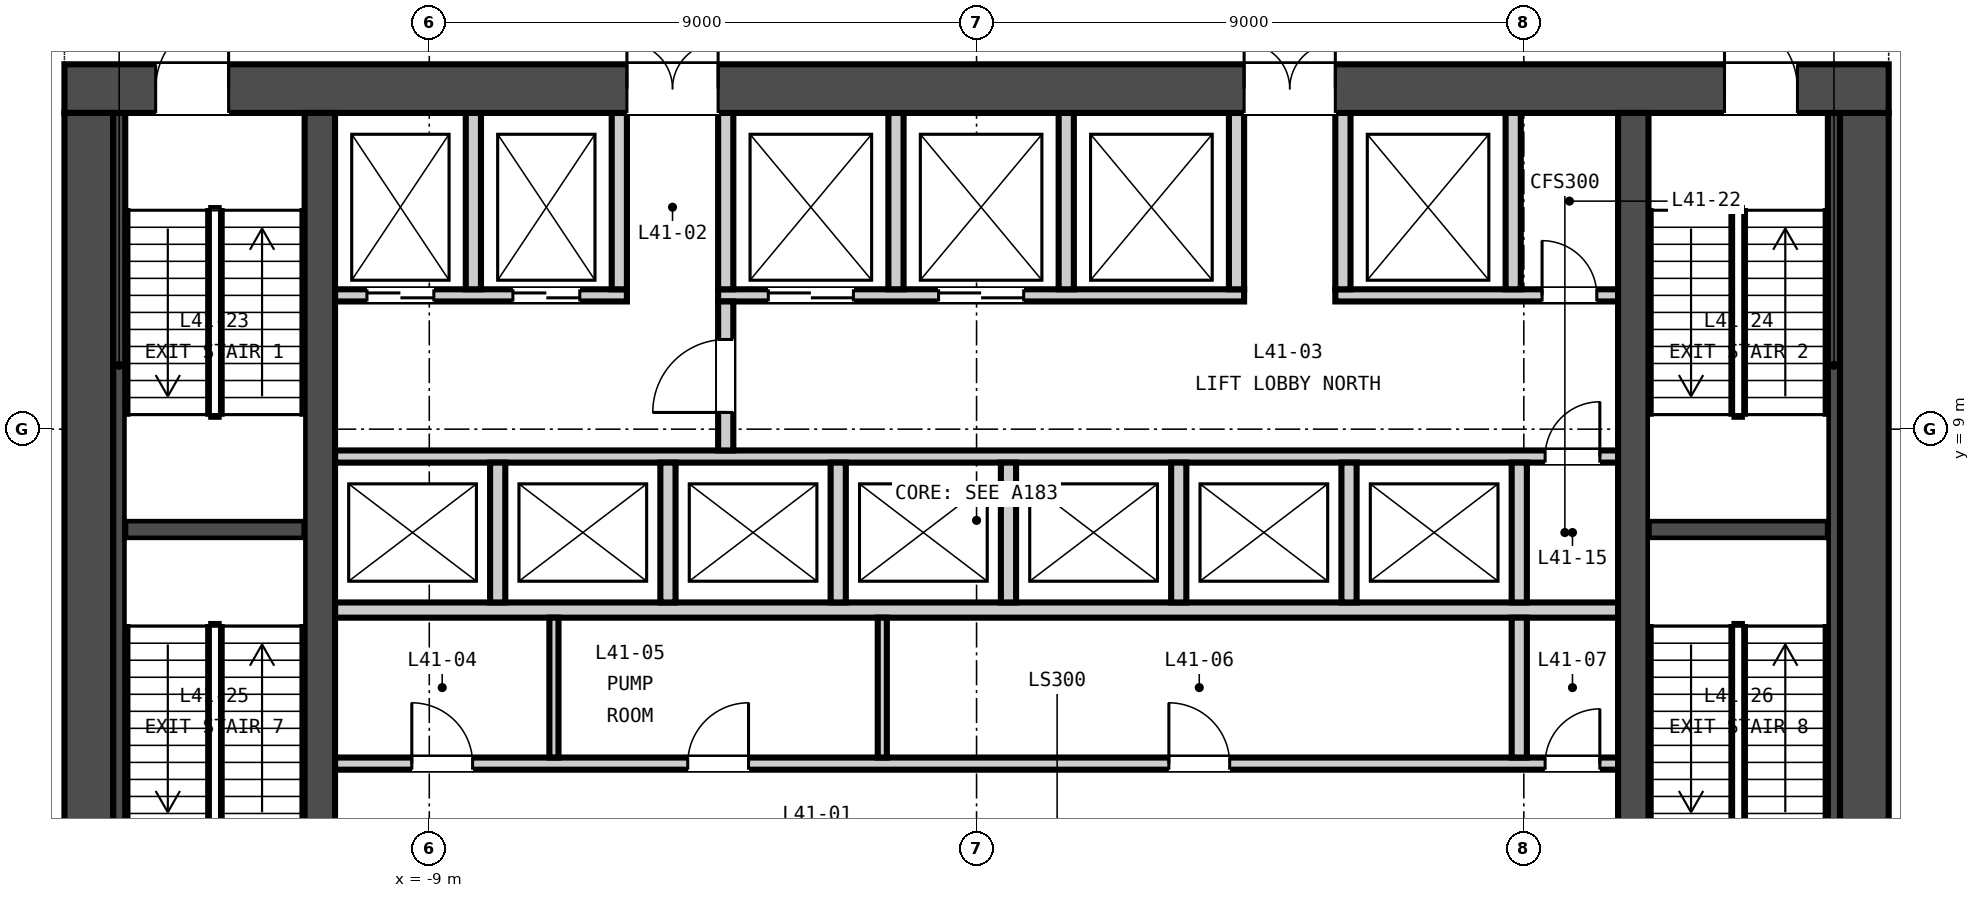
"""IFC4 building model, lengths in metres.
Left out: names, types, materials, properties, quantities, classifications, styles, units other than length and angle.
Written with IfcOpenShell. Run it as: python <this file> out.ifc"""

import sys

from ifc_helpers import new_model, si_unit, direction, frame, frame_2d, origin, place, context, subcontext, project, spatial, rectangle, extrude, element, fill, save


model = new_model("IFC4")
c1 = context("Model", 3, precision=1e-05, world=origin(), true_north=direction((0.0, 1.0)))
c2 = subcontext(c1, "Body", "Model", "MODEL_VIEW")
j1 = project(units=[si_unit("LENGTHUNIT", "METRE"), si_unit("PLANEANGLEUNIT", "RADIAN")], contexts=[c1])
p1 = place(None, origin())
s1 = spatial("IfcSite", under=j1, at=p1, CompositionType="ELEMENT")
p2 = place(p1, origin())
s2 = spatial("IfcBuilding", under=s1, at=p2, CompositionType="ELEMENT")
p3 = place(p2, frame((0.0, 0.0, 166.3)))
s3 = spatial("IfcBuildingStorey", under=s2, at=p3, CompositionType="ELEMENT", Elevation=166.3)
p4 = place(p3, frame((-15.0, 14.6, -0.3), z_axis=(0.0, 0.0, 1.0), x_axis=(1.0, 0.0, 0.0)))
e1 = element("IfcWall", 1, at=p4, inside=s3, PredefinedType="SOLIDWALL", context=c2, shape_type="SweptSolid", body=[
    extrude(rectangle(XDim=30.0, YDim=0.8, at=frame_2d((15.0, 0.0))), origin(), (0.0, 0.0, 1.0), 4.65),
])
p5 = place(p4, frame((9.25, 0.0, 0.3)))
e2 = element("IfcOpeningElement", 2, at=p5, cuts=e1, PredefinedType="OPENING", context=c2, shape_type="SweptSolid", body=[
    extrude(rectangle(XDim=1.5, YDim=2.1, at=frame_2d((0.75, 1.05))), frame((0.0, 0.41, 0.0), z_axis=(0.0, -1.0, 0.0), x_axis=(1.0, 0.0, 0.0)), (0.0, 0.0, 1.0), 0.82),
])
p6 = place(p4, frame((19.4, 0.0, 0.3)))
e3 = element("IfcOpeningElement", 3, at=p6, cuts=e1, PredefinedType="OPENING", context=c2, shape_type="SweptSolid", body=[
    extrude(rectangle(XDim=1.5, YDim=2.1, at=frame_2d((0.75, 1.05))), frame((0.0, 0.41, 0.0), z_axis=(0.0, -1.0, 0.0), x_axis=(1.0, 0.0, 0.0)), (0.0, 0.0, 1.0), 0.82),
])
p7 = place(p4, frame((1.5, 0.0, 0.3)))
e4 = element("IfcOpeningElement", 4, at=p7, cuts=e1, PredefinedType="OPENING", context=c2, shape_type="SweptSolid", body=[
    extrude(rectangle(XDim=1.2, YDim=2.1, at=frame_2d((0.6, 1.05))), frame((0.0, 0.41, 0.0), z_axis=(0.0, -1.0, 0.0), x_axis=(1.0, 0.0, 0.0)), (0.0, 0.0, 1.0), 0.82),
])
p8 = place(p4, frame((27.3, 0.0, 0.3)))
e5 = element("IfcOpeningElement", 5, at=p8, cuts=e1, PredefinedType="OPENING", context=c2, shape_type="SweptSolid", body=[
    extrude(rectangle(XDim=1.2, YDim=2.1, at=frame_2d((0.6, 1.05))), frame((0.0, 0.41, 0.0), z_axis=(0.0, -1.0, 0.0), x_axis=(1.0, 0.0, 0.0)), (0.0, 0.0, 1.0), 0.82),
])
for number, where, z_axis, x_axis in (
    (6, (-14.6, 0.8, -0.3), (0.0, 0.0, 1.0), (0.0, 1.0, 0.0)),
    (7, (14.6, 0.8, -0.3), (0.0, 0.0, 1.0), (0.0, 1.0, 0.0)),
):
    element("IfcWall", number, at=place(p3, frame(where, z_axis=z_axis, x_axis=x_axis)), inside=s3, PredefinedType="SOLIDWALL", context=c2, shape_type="SweptSolid", body=[
        extrude(rectangle(XDim=13.4, YDim=0.8, at=frame_2d((6.7, 0.0))), origin(), (0.0, 0.0, 1.0), 4.65),
    ])
for number, where, z_axis, x_axis in (
    (8, (-10.8, 0.8, -0.3), (0.0, 0.0, 1.0), (0.0, 1.0, 0.0)),
    (9, (10.8, 0.8, -0.3), (0.0, 0.0, 1.0), (0.0, 1.0, 0.0)),
):
    element("IfcWall", number, at=place(p3, frame(where, z_axis=z_axis, x_axis=x_axis)), inside=s3, PredefinedType="SOLIDWALL", context=c2, shape_type="SweptSolid", body=[
        extrude(rectangle(XDim=13.4, YDim=0.5, at=frame_2d((6.7, 0.0))), origin(), (0.0, 0.0, 1.0), 4.65),
    ])
p9 = place(p3, frame((-10.55, 3.5, 0.0), z_axis=(0.0, 0.0, 1.0), x_axis=(1.0, 0.0, 0.0)))
e10 = element("IfcWall", 10, at=p9, inside=s3, PredefinedType="PARTITIONING", context=c2, shape_type="SweptSolid", body=[
    extrude(rectangle(XDim=21.1, YDim=0.2, at=frame_2d((10.55, 0.0))), origin(), (0.0, 0.0, 1.0), 4.35),
])
p10 = place(p9, frame((1.262, 0.0, 0.0)))
e11 = element("IfcOpeningElement", 11, at=p10, cuts=e10, PredefinedType="OPENING", context=c2, shape_type="SweptSolid", body=[
    extrude(rectangle(XDim=1.0, YDim=2.1, at=frame_2d((0.5, 1.05))), frame((0.0, 0.11, 0.0), z_axis=(0.0, -1.0, 0.0), x_axis=(1.0, 0.0, 0.0)), (0.0, 0.0, 1.0), 0.22),
])
p11 = place(p9, frame((5.8, 0.0, 0.0)))
e12 = element("IfcOpeningElement", 12, at=p11, cuts=e10, PredefinedType="OPENING", context=c2, shape_type="SweptSolid", body=[
    extrude(rectangle(XDim=1.0, YDim=2.1, at=frame_2d((0.5, 1.05))), frame((0.0, 0.11, 0.0), z_axis=(0.0, -1.0, 0.0), x_axis=(1.0, 0.0, 0.0)), (0.0, 0.0, 1.0), 0.22),
])
p12 = place(p9, frame((13.712, 0.0, 0.0)))
e13 = element("IfcOpeningElement", 13, at=p12, cuts=e10, PredefinedType="OPENING", context=c2, shape_type="SweptSolid", body=[
    extrude(rectangle(XDim=1.0, YDim=2.1, at=frame_2d((0.5, 1.05))), frame((0.0, 0.11, 0.0), z_axis=(0.0, -1.0, 0.0), x_axis=(1.0, 0.0, 0.0)), (0.0, 0.0, 1.0), 0.22),
])
p13 = place(p9, frame((19.9, 0.0, 0.0)))
e14 = element("IfcOpeningElement", 14, at=p13, cuts=e10, PredefinedType="OPENING", context=c2, shape_type="SweptSolid", body=[
    extrude(rectangle(XDim=0.9, YDim=2.1, at=frame_2d((0.45, 1.05))), frame((0.0, 0.11, 0.0), z_axis=(0.0, -1.0, 0.0), x_axis=(1.0, 0.0, 0.0)), (0.0, 0.0, 1.0), 0.22),
])
p14 = place(p3, frame((-10.55, 6.025, 0.0), z_axis=(0.0, 0.0, 1.0), x_axis=(1.0, 0.0, 0.0)))
e15 = element("IfcWall", 15, at=p14, inside=s3, PredefinedType="PARTITIONING", context=c2, shape_type="SweptSolid", body=[
    extrude(rectangle(XDim=21.1, YDim=0.25, at=frame_2d((10.55, 0.0))), origin(), (0.0, 0.0, 1.0), 4.35),
])
p15 = place(p3, frame((-10.55, 8.55, 0.0), z_axis=(0.0, 0.0, 1.0), x_axis=(1.0, 0.0, 0.0)))
e16 = element("IfcWall", 16, at=p15, inside=s3, PredefinedType="PARTITIONING", context=c2, shape_type="SweptSolid", body=[
    extrude(rectangle(XDim=21.1, YDim=0.2, at=frame_2d((10.55, 0.0))), origin(), (0.0, 0.0, 1.0), 4.35),
])
p16 = place(p15, frame((19.9, 0.0, 0.0)))
e17 = element("IfcOpeningElement", 17, at=p16, cuts=e16, PredefinedType="OPENING", context=c2, shape_type="SweptSolid", body=[
    extrude(rectangle(XDim=0.9, YDim=2.1, at=frame_2d((0.45, 1.05))), frame((0.0, 0.11, 0.0), z_axis=(0.0, -1.0, 0.0), x_axis=(1.0, 0.0, 0.0)), (0.0, 0.0, 1.0), 0.22),
])
p17 = place(p3, frame((-10.55, 11.2, 0.0), z_axis=(0.0, 0.0, 1.0), x_axis=(1.0, 0.0, 0.0)))
e18 = element("IfcWall", 18, at=p17, inside=s3, PredefinedType="PARTITIONING", context=c2, shape_type="SweptSolid", body=[
    extrude(rectangle(XDim=4.8, YDim=0.2, at=frame_2d((2.4, 0.0))), origin(), (0.0, 0.0, 1.0), 4.35),
])
p18 = place(p17, frame((0.525, 0.0, 0.0)))
e19 = element("IfcOpeningElement", 19, at=p18, cuts=e18, PredefinedType="OPENING", context=c2, shape_type="SweptSolid", body=[
    extrude(rectangle(XDim=1.1, YDim=2.1, at=frame_2d((0.55, 1.05))), frame((0.0, 0.11, 0.0), z_axis=(0.0, -1.0, 0.0), x_axis=(1.0, 0.0, 0.0)), (0.0, 0.0, 1.0), 0.22),
])
p19 = place(p17, frame((2.925, 0.0, 0.0)))
e20 = element("IfcOpeningElement", 20, at=p19, cuts=e18, PredefinedType="OPENING", context=c2, shape_type="SweptSolid", body=[
    extrude(rectangle(XDim=1.1, YDim=2.1, at=frame_2d((0.55, 1.05))), frame((0.0, 0.11, 0.0), z_axis=(0.0, -1.0, 0.0), x_axis=(1.0, 0.0, 0.0)), (0.0, 0.0, 1.0), 0.22),
])
p20 = place(p3, frame((-4.25, 11.2, 0.0), z_axis=(0.0, 0.0, 1.0), x_axis=(1.0, 0.0, 0.0)))
e21 = element("IfcWall", 21, at=p20, inside=s3, PredefinedType="PARTITIONING", context=c2, shape_type="SweptSolid", body=[
    extrude(rectangle(XDim=8.65, YDim=0.2, at=frame_2d((4.325, 0.0))), origin(), (0.0, 0.0, 1.0), 4.35),
])
p21 = place(p20, frame((0.825, 0.0, 0.0)))
e22 = element("IfcOpeningElement", 22, at=p21, cuts=e21, PredefinedType="OPENING", context=c2, shape_type="SweptSolid", body=[
    extrude(rectangle(XDim=1.4, YDim=2.1, at=frame_2d((0.7, 1.05))), frame((0.0, 0.11, 0.0), z_axis=(0.0, -1.0, 0.0), x_axis=(1.0, 0.0, 0.0)), (0.0, 0.0, 1.0), 0.22),
])
p22 = place(p20, frame((3.625, 0.0, 0.0)))
e23 = element("IfcOpeningElement", 23, at=p22, cuts=e21, PredefinedType="OPENING", context=c2, shape_type="SweptSolid", body=[
    extrude(rectangle(XDim=1.4, YDim=2.1, at=frame_2d((0.7, 1.05))), frame((0.0, 0.11, 0.0), z_axis=(0.0, -1.0, 0.0), x_axis=(1.0, 0.0, 0.0)), (0.0, 0.0, 1.0), 0.22),
])
p23 = place(p3, frame((5.9, 11.2, 0.0), z_axis=(0.0, 0.0, 1.0), x_axis=(1.0, 0.0, 0.0)))
e24 = element("IfcWall", 24, at=p23, inside=s3, PredefinedType="PARTITIONING", context=c2, shape_type="SweptSolid", body=[
    extrude(rectangle(XDim=4.65, YDim=0.2, at=frame_2d((2.325, 0.0))), origin(), (0.0, 0.0, 1.0), 4.35),
])
p24 = place(p23, frame((3.4, 0.0, 0.0)))
e25 = element("IfcOpeningElement", 25, at=p24, cuts=e24, PredefinedType="OPENING", context=c2, shape_type="SweptSolid", body=[
    extrude(rectangle(XDim=0.9, YDim=2.1, at=frame_2d((0.45, 1.05))), frame((0.0, 0.11, 0.0), z_axis=(0.0, -1.0, 0.0), x_axis=(1.0, 0.0, 0.0)), (0.0, 0.0, 1.0), 0.22),
])
p25 = place(p3, frame((-4.125, 8.65, 0.0), z_axis=(0.0, 0.0, 1.0), x_axis=(0.0, 1.0, 0.0)))
e26 = element("IfcWall", 26, at=p25, inside=s3, PredefinedType="PARTITIONING", context=c2, shape_type="SweptSolid", body=[
    extrude(rectangle(XDim=2.45, YDim=0.25, at=frame_2d((1.225, 0.0))), origin(), (0.0, 0.0, 1.0), 4.35),
])
p26 = place(p25, frame((0.625, 0.0, 0.0)))
e27 = element("IfcOpeningElement", 27, at=p26, cuts=e26, PredefinedType="OPENING", context=c2, shape_type="SweptSolid", body=[
    extrude(rectangle(XDim=1.2, YDim=2.1, at=frame_2d((0.6, 1.05))), frame((0.0, 0.135, 0.0), z_axis=(0.0, -1.0, 0.0), x_axis=(1.0, 0.0, 0.0)), (0.0, 0.0, 1.0), 0.27),
])
for number, where, z_axis, x_axis in (
    (28, (-6.95, 3.6, 0.0), (0.0, 0.0, 1.0), (0.0, 1.0, 0.0)),
    (29, (-1.55, 3.6, 0.0), (0.0, 0.0, 1.0), (0.0, 1.0, 0.0)),
):
    element("IfcWall", number, at=place(p3, frame(where, z_axis=z_axis, x_axis=x_axis)), inside=s3, PredefinedType="PARTITIONING", context=c2, shape_type="SweptSolid", body=[
        extrude(rectangle(XDim=2.3, YDim=0.15, at=frame_2d((1.15, 0.0))), origin(), (0.0, 0.0, 1.0), 4.35),
    ])
p27 = place(p3, frame((8.925, 3.6, 0.0), z_axis=(0.0, 0.0, 1.0), x_axis=(0.0, 1.0, 0.0)))
e30 = element("IfcWall", 30, at=p27, inside=s3, PredefinedType="PARTITIONING", context=c2, shape_type="SweptSolid", body=[
    extrude(rectangle(XDim=2.3, YDim=0.25, at=frame_2d((1.15, 0.0))), origin(), (0.0, 0.0, 1.0), 4.35),
])
for number, where, z_axis, x_axis in (
    (31, (-7.875, 6.15, 0.0), (0.0, 0.0, 1.0), (0.0, 1.0, 0.0)),
    (32, (-5.075, 6.15, 0.0), (0.0, 0.0, 1.0), (0.0, 1.0, 0.0)),
    (33, (-2.275, 6.15, 0.0), (0.0, 0.0, 1.0), (0.0, 1.0, 0.0)),
    (34, (0.525, 6.15, 0.0), (0.0, 0.0, 1.0), (0.0, 1.0, 0.0)),
    (35, (3.325, 6.15, 0.0), (0.0, 0.0, 1.0), (0.0, 1.0, 0.0)),
    (36, (6.125, 6.15, 0.0), (0.0, 0.0, 1.0), (0.0, 1.0, 0.0)),
    (37, (8.925, 6.15, 0.0), (0.0, 0.0, 1.0), (0.0, 1.0, 0.0)),
):
    element("IfcWall", number, at=place(p3, frame(where, z_axis=z_axis, x_axis=x_axis)), inside=s3, PredefinedType="PARTITIONING", context=c2, shape_type="SweptSolid", body=[
        extrude(rectangle(XDim=2.3, YDim=0.25, at=frame_2d((1.15, 0.0))), origin(), (0.0, 0.0, 1.0), 4.35),
    ])
for number, where, z_axis, x_axis in (
    (38, (-8.275, 11.3, 0.0), (0.0, 0.0, 1.0), (0.0, 1.0, 0.0)),
    (39, (-5.875, 11.3, 0.0), (0.0, 0.0, 1.0), (0.0, 1.0, 0.0)),
    (40, (-4.125, 11.3, 0.0), (0.0, 0.0, 1.0), (0.0, 1.0, 0.0)),
    (41, (-1.325, 11.3, 0.0), (0.0, 0.0, 1.0), (0.0, 1.0, 0.0)),
    (42, (1.475, 11.3, 0.0), (0.0, 0.0, 1.0), (0.0, 1.0, 0.0)),
    (43, (4.275, 11.3, 0.0), (0.0, 0.0, 1.0), (0.0, 1.0, 0.0)),
    (44, (6.025, 11.3, 0.0), (0.0, 0.0, 1.0), (0.0, 1.0, 0.0)),
    (45, (8.825, 11.3, 0.0), (0.0, 0.0, 1.0), (0.0, 1.0, 0.0)),
):
    element("IfcWall", number, at=place(p3, frame(where, z_axis=z_axis, x_axis=x_axis)), inside=s3, PredefinedType="PARTITIONING", context=c2, shape_type="SweptSolid", body=[
        extrude(rectangle(XDim=2.9, YDim=0.25, at=frame_2d((1.45, 0.0))), origin(), (0.0, 0.0, 1.0), 4.35),
    ])
p28 = place(p3, frame((-14.0, 7.35, 0.0), z_axis=(0.0, 0.0, 1.0), x_axis=(1.0, 0.0, 0.0)))
e46 = element("IfcWall", 46, at=p28, inside=s3, PredefinedType="SOLIDWALL", context=c2, shape_type="SweptSolid", body=[
    extrude(rectangle(XDim=2.95, YDim=0.3, at=frame_2d((1.475, 0.0))), origin(), (0.0, 0.0, 1.0), 4.35),
])
p29 = place(p3, frame((-14.1, 0.8, 0.0), z_axis=(0.0, 0.0, 1.0), x_axis=(0.0, 1.0, 0.0)))
e47 = element("IfcWall", 47, at=p29, inside=s3, PredefinedType="SOLIDWALL", context=c2, shape_type="SweptSolid", body=[
    extrude(rectangle(XDim=13.4, YDim=0.2, at=frame_2d((6.7, 0.0))), origin(), (0.0, 0.0, 1.0), 4.35),
])
p30 = place(p3, frame((11.05, 7.35, 0.0), z_axis=(0.0, 0.0, 1.0), x_axis=(1.0, 0.0, 0.0)))
e48 = element("IfcWall", 48, at=p30, inside=s3, PredefinedType="SOLIDWALL", context=c2, shape_type="SweptSolid", body=[
    extrude(rectangle(XDim=2.95, YDim=0.3, at=frame_2d((1.475, 0.0))), origin(), (0.0, 0.0, 1.0), 4.35),
])
p31 = place(p3, frame((14.1, 0.8, 0.0), z_axis=(0.0, 0.0, 1.0), x_axis=(0.0, 1.0, 0.0)))
e49 = element("IfcWall", 49, at=p31, inside=s3, PredefinedType="SOLIDWALL", context=c2, shape_type="SweptSolid", body=[
    extrude(rectangle(XDim=13.4, YDim=0.2, at=frame_2d((6.7, 0.0))), origin(), (0.0, 0.0, 1.0), 4.35),
])
p32 = place(p26, origin())
e50 = element("IfcDoor", 50, at=p32, inside=s3, OperationType="SINGLE_SWING_LEFT", PredefinedType="DOOR", context=c2, shape_type="SweptSolid", body=[
    extrude(rectangle(XDim=1.2, YDim=2.1, at=frame_2d((0.6, 1.05))), frame((0.0, 0.025, 0.0), z_axis=(0.0, -1.0, 0.0), x_axis=(1.0, 0.0, 0.0)), (0.0, 0.0, 1.0), 0.05),
])
fill(e27, e50)
p33 = place(p10, origin())
e51 = element("IfcDoor", 51, at=p33, inside=s3, OperationType="SINGLE_SWING_LEFT", PredefinedType="DOOR", context=c2, shape_type="SweptSolid", body=[
    extrude(rectangle(XDim=1.0, YDim=2.1, at=frame_2d((0.5, 1.05))), frame((0.0, 0.025, 0.0), z_axis=(0.0, -1.0, 0.0), x_axis=(1.0, 0.0, 0.0)), (0.0, 0.0, 1.0), 0.05),
])
fill(e11, e51)
p34 = place(p11, origin())
e52 = element("IfcDoor", 52, at=p34, inside=s3, OperationType="SINGLE_SWING_RIGHT", PredefinedType="DOOR", context=c2, shape_type="SweptSolid", body=[
    extrude(rectangle(XDim=1.0, YDim=2.1, at=frame_2d((0.5, 1.05))), frame((0.0, 0.025, 0.0), z_axis=(0.0, -1.0, 0.0), x_axis=(1.0, 0.0, 0.0)), (0.0, 0.0, 1.0), 0.05),
])
fill(e12, e52)
p35 = place(p12, origin())
e53 = element("IfcDoor", 53, at=p35, inside=s3, OperationType="SINGLE_SWING_LEFT", PredefinedType="DOOR", context=c2, shape_type="SweptSolid", body=[
    extrude(rectangle(XDim=1.0, YDim=2.1, at=frame_2d((0.5, 1.05))), frame((0.0, 0.025, 0.0), z_axis=(0.0, -1.0, 0.0), x_axis=(1.0, 0.0, 0.0)), (0.0, 0.0, 1.0), 0.05),
])
fill(e13, e53)
p36 = place(p13, origin())
e54 = element("IfcDoor", 54, at=p36, inside=s3, OperationType="SINGLE_SWING_RIGHT", PredefinedType="DOOR", context=c2, shape_type="SweptSolid", body=[
    extrude(rectangle(XDim=0.9, YDim=2.1, at=frame_2d((0.45, 1.05))), frame((0.0, 0.025, 0.0), z_axis=(0.0, -1.0, 0.0), x_axis=(1.0, 0.0, 0.0)), (0.0, 0.0, 1.0), 0.05),
])
fill(e14, e54)
p37 = place(p16, origin())
e55 = element("IfcDoor", 55, at=p37, inside=s3, OperationType="SINGLE_SWING_RIGHT", PredefinedType="DOOR", context=c2, shape_type="SweptSolid", body=[
    extrude(rectangle(XDim=0.9, YDim=2.1, at=frame_2d((0.45, 1.05))), frame((0.0, 0.025, 0.0), z_axis=(0.0, -1.0, 0.0), x_axis=(1.0, 0.0, 0.0)), (0.0, 0.0, 1.0), 0.05),
])
fill(e17, e55)
p38 = place(p18, origin())
e56 = element("IfcDoor", 56, at=p38, inside=s3, OperationType="DOUBLE_DOOR_SLIDING", PredefinedType="DOOR", context=c2, shape_type="SweptSolid", body=[
    extrude(rectangle(XDim=1.1, YDim=2.1, at=frame_2d((0.55, 1.05))), frame((0.0, 0.025, 0.0), z_axis=(0.0, -1.0, 0.0), x_axis=(1.0, 0.0, 0.0)), (0.0, 0.0, 1.0), 0.05),
])
fill(e19, e56)
p39 = place(p19, origin())
e57 = element("IfcDoor", 57, at=p39, inside=s3, OperationType="DOUBLE_DOOR_SLIDING", PredefinedType="DOOR", context=c2, shape_type="SweptSolid", body=[
    extrude(rectangle(XDim=1.1, YDim=2.1, at=frame_2d((0.55, 1.05))), frame((0.0, 0.025, 0.0), z_axis=(0.0, -1.0, 0.0), x_axis=(1.0, 0.0, 0.0)), (0.0, 0.0, 1.0), 0.05),
])
fill(e20, e57)
p40 = place(p21, origin())
e58 = element("IfcDoor", 58, at=p40, inside=s3, OperationType="DOUBLE_DOOR_SLIDING", PredefinedType="DOOR", context=c2, shape_type="SweptSolid", body=[
    extrude(rectangle(XDim=1.4, YDim=2.1, at=frame_2d((0.7, 1.05))), frame((0.0, 0.025, 0.0), z_axis=(0.0, -1.0, 0.0), x_axis=(1.0, 0.0, 0.0)), (0.0, 0.0, 1.0), 0.05),
])
fill(e22, e58)
p41 = place(p22, origin())
e59 = element("IfcDoor", 59, at=p41, inside=s3, OperationType="DOUBLE_DOOR_SLIDING", PredefinedType="DOOR", context=c2, shape_type="SweptSolid", body=[
    extrude(rectangle(XDim=1.4, YDim=2.1, at=frame_2d((0.7, 1.05))), frame((0.0, 0.025, 0.0), z_axis=(0.0, -1.0, 0.0), x_axis=(1.0, 0.0, 0.0)), (0.0, 0.0, 1.0), 0.05),
])
fill(e23, e59)
p42 = place(p24, origin())
e60 = element("IfcDoor", 60, at=p42, inside=s3, OperationType="SINGLE_SWING_LEFT", PredefinedType="DOOR", context=c2, shape_type="SweptSolid", body=[
    extrude(rectangle(XDim=0.9, YDim=2.1, at=frame_2d((0.45, 1.05))), frame((0.0, 0.025, 0.0), z_axis=(0.0, -1.0, 0.0), x_axis=(1.0, 0.0, 0.0)), (0.0, 0.0, 1.0), 0.05),
])
fill(e25, e60)
p43 = place(p5, origin())
e61 = element("IfcDoor", 61, at=p43, inside=s3, OperationType="DOUBLE_DOOR_SINGLE_SWING", PredefinedType="DOOR", context=c2, shape_type="SweptSolid", body=[
    extrude(rectangle(XDim=1.5, YDim=2.1, at=frame_2d((0.75, 1.05))), frame((0.0, 0.025, 0.0), z_axis=(0.0, -1.0, 0.0), x_axis=(1.0, 0.0, 0.0)), (0.0, 0.0, 1.0), 0.05),
])
fill(e2, e61)
p44 = place(p6, origin())
e62 = element("IfcDoor", 62, at=p44, inside=s3, OperationType="DOUBLE_DOOR_SINGLE_SWING", PredefinedType="DOOR", context=c2, shape_type="SweptSolid", body=[
    extrude(rectangle(XDim=1.5, YDim=2.1, at=frame_2d((0.75, 1.05))), frame((0.0, 0.025, 0.0), z_axis=(0.0, -1.0, 0.0), x_axis=(1.0, 0.0, 0.0)), (0.0, 0.0, 1.0), 0.05),
])
fill(e3, e62)
p45 = place(p7, origin())
e63 = element("IfcDoor", 63, at=p45, inside=s3, OperationType="SINGLE_SWING_RIGHT", PredefinedType="DOOR", context=c2, shape_type="SweptSolid", body=[
    extrude(rectangle(XDim=1.2, YDim=2.1, at=frame_2d((0.6, 1.05))), frame((0.0, 0.025, 0.0), z_axis=(0.0, -1.0, 0.0), x_axis=(1.0, 0.0, 0.0)), (0.0, 0.0, 1.0), 0.05),
])
fill(e4, e63)
p46 = place(p8, origin())
e64 = element("IfcDoor", 64, at=p46, inside=s3, OperationType="SINGLE_SWING_LEFT", PredefinedType="DOOR", context=c2, shape_type="SweptSolid", body=[
    extrude(rectangle(XDim=1.2, YDim=2.1, at=frame_2d((0.6, 1.05))), frame((0.0, 0.025, 0.0), z_axis=(0.0, -1.0, 0.0), x_axis=(1.0, 0.0, 0.0)), (0.0, 0.0, 1.0), 0.05),
])
fill(e5, e64)
save(model, sys.argv[1])
